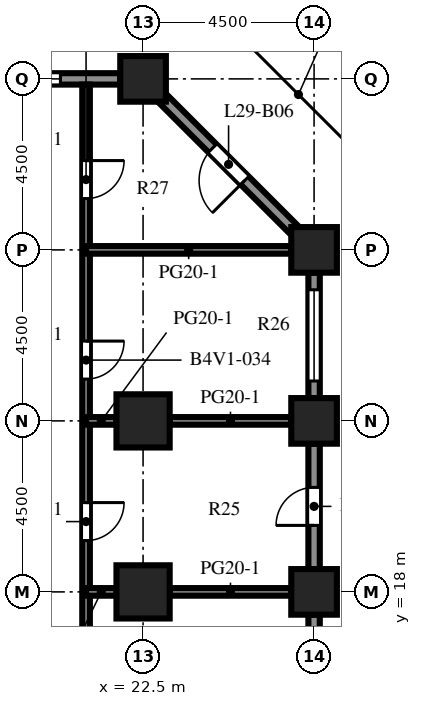
"""IFC4 building model, lengths in metres.
Left out: names, types, materials, properties, quantities, classifications, styles, units other than length and angle.
Written with IfcOpenShell. Run it as: python <this file> out.ifc"""

import sys

from ifc_helpers import new_model, si_unit, direction, frame, frame_2d, origin, origin_2d, place, context, subcontext, project, spatial, rectangle, extrude, element, fill, save


model = new_model("IFC4")
c1 = context("Model", 3, precision=1e-05, world=origin(), true_north=direction((0.0, 1.0)))
c2 = subcontext(c1, "Body", "Model", "MODEL_VIEW")
j1 = project(units=[si_unit("LENGTHUNIT", "METRE"), si_unit("PLANEANGLEUNIT", "RADIAN")], contexts=[c1])
p1 = place(None, origin())
s1 = spatial("IfcSite", under=j1, at=p1, CompositionType="ELEMENT")
p2 = place(p1, origin())
s2 = spatial("IfcBuilding", under=s1, at=p2, CompositionType="ELEMENT")
p3 = place(p2, frame((0.0, 0.0, 129.0)))
s3 = spatial("IfcBuildingStorey", under=s2, at=p3, CompositionType="ELEMENT", Elevation=129.0)
for number, where, z_axis, x_axis in (
    (1, (22.5, 31.5, 0.0), (0.0, 0.0, 1.0), (1.0, 0.0, 0.0)),
    (2, (27.0, 18.0, 0.0), (0.0, 0.0, 1.0), (1.0, 0.0, 0.0)),
    (3, (27.0, 22.5, 0.0), (0.0, 0.0, 1.0), (1.0, 0.0, 0.0)),
    (4, (27.0, 27.0, 0.0), (0.0, 0.0, 1.0), (1.0, 0.0, 0.0)),
):
    element("IfcColumn", number, at=place(p3, frame(where, z_axis=z_axis, x_axis=x_axis)), inside=s3, PredefinedType="COLUMN", context=c2, shape_type="SweptSolid", body=[
        extrude(rectangle(XDim=1.2, YDim=1.2, at=origin_2d()), origin(), (0.0, 0.0, 1.0), 4.1),
    ])
for number, where, z_axis, x_axis in (
    (5, (22.5, 18.0, 0.0), (0.0, 0.0, 1.0), (1.0, 0.0, 0.0)),
    (6, (22.5, 22.5, 0.0), (0.0, 0.0, 1.0), (1.0, 0.0, 0.0)),
):
    element("IfcColumn", number, at=place(p3, frame(where, z_axis=z_axis, x_axis=x_axis)), inside=s3, PredefinedType="COLUMN", context=c2, shape_type="SweptSolid", body=[
        extrude(rectangle(XDim=1.4, YDim=1.4, at=origin_2d()), origin(), (0.0, 0.0, 1.0), 4.1),
    ])
p4 = place(p3, frame((27.0, 17.4, 0.0), z_axis=(0.0, 0.0, 1.0), x_axis=(0.0, -1.0, 0.0)))
e7 = element("IfcWall", 7, at=p4, inside=s3, PredefinedType="SOLIDWALL", context=c2, shape_type="SweptSolid", body=[
    extrude(rectangle(XDim=3.3, YDim=0.3, at=frame_2d((1.65, 0.0))), origin(), (0.0, 0.0, 1.0), 2.75),
])
p5 = place(p4, frame((0.45, 0.0, 0.8)))
e8 = element("IfcOpeningElement", 8, at=p5, cuts=e7, PredefinedType="OPENING", context=c2, shape_type="SweptSolid", body=[
    extrude(rectangle(XDim=2.4, YDim=1.7, at=frame_2d((1.2, 0.85))), frame((0.0, 0.16, 0.0), z_axis=(0.0, -1.0, 0.0), x_axis=(1.0, 0.0, 0.0)), (0.0, 0.0, 1.0), 0.32),
])
p6 = place(p3, frame((27.0, 21.9, 0.0), z_axis=(0.0, 0.0, 1.0), x_axis=(0.0, -1.0, 0.0)))
e9 = element("IfcWall", 9, at=p6, inside=s3, PredefinedType="SOLIDWALL", context=c2, shape_type="SweptSolid", body=[
    extrude(rectangle(XDim=3.3, YDim=0.3, at=frame_2d((1.65, 0.0))), origin(), (0.0, 0.0, 1.0), 2.75),
])
p7 = place(p6, frame((1.15, 0.0, 0.0)))
e10 = element("IfcOpeningElement", 10, at=p7, cuts=e9, PredefinedType="OPENING", context=c2, shape_type="SweptSolid", body=[
    extrude(rectangle(XDim=1.0, YDim=2.2, at=frame_2d((0.5, 1.1))), frame((0.0, 0.16, 0.0), z_axis=(0.0, -1.0, 0.0), x_axis=(1.0, 0.0, 0.0)), (0.0, 0.0, 1.0), 0.32),
])
p8 = place(p3, frame((27.0, 26.4, 0.0), z_axis=(0.0, 0.0, 1.0), x_axis=(0.0, -1.0, 0.0)))
e11 = element("IfcWall", 11, at=p8, inside=s3, PredefinedType="SOLIDWALL", context=c2, shape_type="SweptSolid", body=[
    extrude(rectangle(XDim=3.3, YDim=0.3, at=frame_2d((1.65, 0.0))), origin(), (0.0, 0.0, 1.0), 2.75),
])
p9 = place(p8, frame((0.45, 0.0, 0.8)))
e12 = element("IfcOpeningElement", 12, at=p9, cuts=e11, PredefinedType="OPENING", context=c2, shape_type="SweptSolid", body=[
    extrude(rectangle(XDim=2.4, YDim=1.7, at=frame_2d((1.2, 0.85))), frame((0.0, 0.16, 0.0), z_axis=(0.0, -1.0, 0.0), x_axis=(1.0, 0.0, 0.0)), (0.0, 0.0, 1.0), 0.32),
])
p10 = place(p3, frame((22.994, 31.006, 0.0), z_axis=(0.0, 0.0, 1.0), x_axis=(0.707106781187, -0.707106781187, 0.0)))
e13 = element("IfcWall", 13, at=p10, inside=s3, PredefinedType="SOLIDWALL", context=c2, shape_type="SweptSolid", body=[
    extrude(rectangle(XDim=4.967, YDim=0.3, at=frame_2d((2.483, 0.0))), origin(), (0.0, 0.0, 1.0), 2.75),
])
p11 = place(p10, frame((1.884, 0.0, 0.0)))
e14 = element("IfcOpeningElement", 14, at=p11, cuts=e13, PredefinedType="OPENING", context=c2, shape_type="SweptSolid", body=[
    extrude(rectangle(XDim=1.2, YDim=2.2, at=frame_2d((0.6, 1.1))), frame((0.0, 0.16, 0.0), z_axis=(0.0, -1.0, 0.0), x_axis=(1.0, 0.0, 0.0)), (0.0, 0.0, 1.0), 0.32),
])
p12 = place(p3, frame((18.6, 31.5, 0.0), z_axis=(0.0, 0.0, 1.0), x_axis=(1.0, 0.0, 0.0)))
e15 = element("IfcWall", 15, at=p12, inside=s3, PredefinedType="SOLIDWALL", context=c2, shape_type="SweptSolid", body=[
    extrude(rectangle(XDim=3.3, YDim=0.3, at=frame_2d((1.65, 0.0))), origin(), (0.0, 0.0, 1.0), 2.75),
])
p13 = place(p12, frame((0.525, 0.0, 0.8)))
e16 = element("IfcOpeningElement", 16, at=p13, cuts=e15, PredefinedType="OPENING", context=c2, shape_type="SweptSolid", body=[
    extrude(rectangle(XDim=1.2, YDim=1.7, at=frame_2d((0.6, 0.85))), frame((0.0, 0.16, 0.0), z_axis=(0.0, -1.0, 0.0), x_axis=(1.0, 0.0, 0.0)), (0.0, 0.0, 1.0), 0.32),
])
p14 = place(p3, frame((21.0, 31.35, 0.0), z_axis=(0.0, 0.0, 1.0), x_axis=(0.0, -1.0, 0.0)))
e17 = element("IfcWall", 17, at=p14, inside=s3, PredefinedType="PARTITIONING", context=c2, shape_type="SweptSolid", body=[
    extrude(rectangle(XDim=53.7, YDim=0.2, at=frame_2d((26.85, 0.0))), origin(), (0.0, 0.0, 1.0), 3.65),
])
p15 = place(p14, frame((47.5, 0.0, 0.0)))
e18 = element("IfcOpeningElement", 18, at=p15, cuts=e17, PredefinedType="OPENING", context=c2, shape_type="SweptSolid", body=[
    extrude(rectangle(XDim=1.0, YDim=2.1, at=frame_2d((0.5, 1.05))), frame((0.0, 0.11, 0.0), z_axis=(0.0, -1.0, 0.0), x_axis=(1.0, 0.0, 0.0)), (0.0, 0.0, 1.0), 0.22),
])
p16 = place(p14, frame((41.5, 0.0, 0.0)))
e19 = element("IfcOpeningElement", 19, at=p16, cuts=e17, PredefinedType="OPENING", context=c2, shape_type="SweptSolid", body=[
    extrude(rectangle(XDim=1.0, YDim=2.1, at=frame_2d((0.5, 1.05))), frame((0.0, 0.11, 0.0), z_axis=(0.0, -1.0, 0.0), x_axis=(1.0, 0.0, 0.0)), (0.0, 0.0, 1.0), 0.22),
])
p17 = place(p14, frame((33.5, 0.0, 0.0)))
e20 = element("IfcOpeningElement", 20, at=p17, cuts=e17, PredefinedType="OPENING", context=c2, shape_type="SweptSolid", body=[
    extrude(rectangle(XDim=1.0, YDim=2.1, at=frame_2d((0.5, 1.05))), frame((0.0, 0.11, 0.0), z_axis=(0.0, -1.0, 0.0), x_axis=(1.0, 0.0, 0.0)), (0.0, 0.0, 1.0), 0.22),
])
p18 = place(p14, frame((23.75, 0.0, 0.0)))
e21 = element("IfcOpeningElement", 21, at=p18, cuts=e17, PredefinedType="OPENING", context=c2, shape_type="SweptSolid", body=[
    extrude(rectangle(XDim=1.0, YDim=2.1, at=frame_2d((0.5, 1.05))), frame((0.0, 0.11, 0.0), z_axis=(0.0, -1.0, 0.0), x_axis=(1.0, 0.0, 0.0)), (0.0, 0.0, 1.0), 0.22),
])
p19 = place(p14, frame((16.25, 0.0, 0.0)))
e22 = element("IfcOpeningElement", 22, at=p19, cuts=e17, PredefinedType="OPENING", context=c2, shape_type="SweptSolid", body=[
    extrude(rectangle(XDim=1.0, YDim=2.1, at=frame_2d((0.5, 1.05))), frame((0.0, 0.11, 0.0), z_axis=(0.0, -1.0, 0.0), x_axis=(1.0, 0.0, 0.0)), (0.0, 0.0, 1.0), 0.22),
])
p20 = place(p14, frame((11.0, 0.0, 0.0)))
e23 = element("IfcOpeningElement", 23, at=p20, cuts=e17, PredefinedType="OPENING", context=c2, shape_type="SweptSolid", body=[
    extrude(rectangle(XDim=1.0, YDim=2.1, at=frame_2d((0.5, 1.05))), frame((0.0, 0.11, 0.0), z_axis=(0.0, -1.0, 0.0), x_axis=(1.0, 0.0, 0.0)), (0.0, 0.0, 1.0), 0.22),
])
p21 = place(p14, frame((6.75, 0.0, 0.0)))
e24 = element("IfcOpeningElement", 24, at=p21, cuts=e17, PredefinedType="OPENING", context=c2, shape_type="SweptSolid", body=[
    extrude(rectangle(XDim=1.0, YDim=2.1, at=frame_2d((0.5, 1.05))), frame((0.0, 0.11, 0.0), z_axis=(0.0, -1.0, 0.0), x_axis=(1.0, 0.0, 0.0)), (0.0, 0.0, 1.0), 0.22),
])
p22 = place(p14, frame((2.0, 0.0, 0.0)))
e25 = element("IfcOpeningElement", 25, at=p22, cuts=e17, PredefinedType="OPENING", context=c2, shape_type="SweptSolid", body=[
    extrude(rectangle(XDim=1.0, YDim=2.1, at=frame_2d((0.5, 1.05))), frame((0.0, 0.11, 0.0), z_axis=(0.0, -1.0, 0.0), x_axis=(1.0, 0.0, 0.0)), (0.0, 0.0, 1.0), 0.22),
])
p23 = place(p3, frame((21.0, 18.0, 0.0), z_axis=(0.0, 0.0, 1.0), x_axis=(1.0, 0.0, 0.0)))
e26 = element("IfcWall", 26, at=p23, inside=s3, PredefinedType="PARTITIONING", context=c2, shape_type="SweptSolid", body=[
    extrude(rectangle(XDim=0.8, YDim=0.2, at=frame_2d((0.4, 0.0))), origin(), (0.0, 0.0, 1.0), 3.65),
])
p24 = place(p3, frame((23.2, 18.0, 0.0), z_axis=(0.0, 0.0, 1.0), x_axis=(1.0, 0.0, 0.0)))
e27 = element("IfcWall", 27, at=p24, inside=s3, PredefinedType="PARTITIONING", context=c2, shape_type="SweptSolid", body=[
    extrude(rectangle(XDim=3.2, YDim=0.2, at=frame_2d((1.6, 0.0))), origin(), (0.0, 0.0, 1.0), 3.65),
])
p25 = place(p3, frame((21.0, 22.5, 0.0), z_axis=(0.0, 0.0, 1.0), x_axis=(1.0, 0.0, 0.0)))
e28 = element("IfcWall", 28, at=p25, inside=s3, PredefinedType="PARTITIONING", context=c2, shape_type="SweptSolid", body=[
    extrude(rectangle(XDim=0.8, YDim=0.2, at=frame_2d((0.4, 0.0))), origin(), (0.0, 0.0, 1.0), 3.65),
])
p26 = place(p3, frame((23.2, 22.5, 0.0), z_axis=(0.0, 0.0, 1.0), x_axis=(1.0, 0.0, 0.0)))
e29 = element("IfcWall", 29, at=p26, inside=s3, PredefinedType="PARTITIONING", context=c2, shape_type="SweptSolid", body=[
    extrude(rectangle(XDim=3.2, YDim=0.2, at=frame_2d((1.6, 0.0))), origin(), (0.0, 0.0, 1.0), 3.65),
])
p27 = place(p3, frame((21.0, 27.0, 0.0), z_axis=(0.0, 0.0, 1.0), x_axis=(1.0, 0.0, 0.0)))
e30 = element("IfcWall", 30, at=p27, inside=s3, PredefinedType="PARTITIONING", context=c2, shape_type="SweptSolid", body=[
    extrude(rectangle(XDim=5.4, YDim=0.2, at=frame_2d((2.7, 0.0))), origin(), (0.0, 0.0, 1.0), 3.65),
])
p28 = place(p7, origin())
e31 = element("IfcDoor", 31, at=p28, inside=s3, OperationType="SINGLE_SWING_RIGHT", PredefinedType="DOOR", context=c2, shape_type="SweptSolid", body=[
    extrude(rectangle(XDim=1.0, YDim=2.2, at=frame_2d((0.5, 1.1))), frame((0.0, 0.025, 0.0), z_axis=(0.0, -1.0, 0.0), x_axis=(1.0, 0.0, 0.0)), (0.0, 0.0, 1.0), 0.05),
])
fill(e10, e31)
p29 = place(p9, origin())
e32 = element("IfcWindow", 32, at=p29, inside=s3, PartitioningType="SINGLE_PANEL", PredefinedType="WINDOW", context=c2, shape_type="SweptSolid", body=[
    extrude(rectangle(XDim=2.4, YDim=1.7, at=frame_2d((1.2, 0.85))), frame((0.0, 0.03, 0.0), z_axis=(0.0, -1.0, 0.0), x_axis=(1.0, 0.0, 0.0)), (0.0, 0.0, 1.0), 0.06),
])
fill(e12, e32)
p30 = place(p11, origin())
e33 = element("IfcDoor", 33, at=p30, inside=s3, OperationType="SINGLE_SWING_RIGHT", PredefinedType="DOOR", context=c2, shape_type="SweptSolid", body=[
    extrude(rectangle(XDim=1.2, YDim=2.2, at=frame_2d((0.6, 1.1))), frame((0.0, 0.025, 0.0), z_axis=(0.0, -1.0, 0.0), x_axis=(1.0, 0.0, 0.0)), (0.0, 0.0, 1.0), 0.05),
])
fill(e14, e33)
p31 = place(p13, origin())
e34 = element("IfcWindow", 34, at=p31, inside=s3, PartitioningType="SINGLE_PANEL", PredefinedType="WINDOW", context=c2, shape_type="SweptSolid", body=[
    extrude(rectangle(XDim=1.2, YDim=1.7, at=frame_2d((0.6, 0.85))), frame((0.0, 0.03, 0.0), z_axis=(0.0, -1.0, 0.0), x_axis=(1.0, 0.0, 0.0)), (0.0, 0.0, 1.0), 0.06),
])
fill(e16, e34)
p32 = place(p20, origin())
e35 = element("IfcDoor", 35, at=p32, inside=s3, OperationType="SINGLE_SWING_LEFT", PredefinedType="DOOR", context=c2, shape_type="SweptSolid", body=[
    extrude(rectangle(XDim=1.0, YDim=2.1, at=frame_2d((0.5, 1.05))), frame((0.0, 0.025, 0.0), z_axis=(0.0, -1.0, 0.0), x_axis=(1.0, 0.0, 0.0)), (0.0, 0.0, 1.0), 0.05),
])
fill(e23, e35)
p33 = place(p21, origin())
e36 = element("IfcDoor", 36, at=p33, inside=s3, OperationType="SINGLE_SWING_LEFT", PredefinedType="DOOR", context=c2, shape_type="SweptSolid", body=[
    extrude(rectangle(XDim=1.0, YDim=2.1, at=frame_2d((0.5, 1.05))), frame((0.0, 0.025, 0.0), z_axis=(0.0, -1.0, 0.0), x_axis=(1.0, 0.0, 0.0)), (0.0, 0.0, 1.0), 0.05),
])
fill(e24, e36)
p34 = place(p22, origin())
e37 = element("IfcDoor", 37, at=p34, inside=s3, OperationType="SINGLE_SWING_LEFT", PredefinedType="DOOR", context=c2, shape_type="SweptSolid", body=[
    extrude(rectangle(XDim=1.0, YDim=2.1, at=frame_2d((0.5, 1.05))), frame((0.0, 0.025, 0.0), z_axis=(0.0, -1.0, 0.0), x_axis=(1.0, 0.0, 0.0)), (0.0, 0.0, 1.0), 0.05),
])
fill(e25, e37)
save(model, sys.argv[1])
